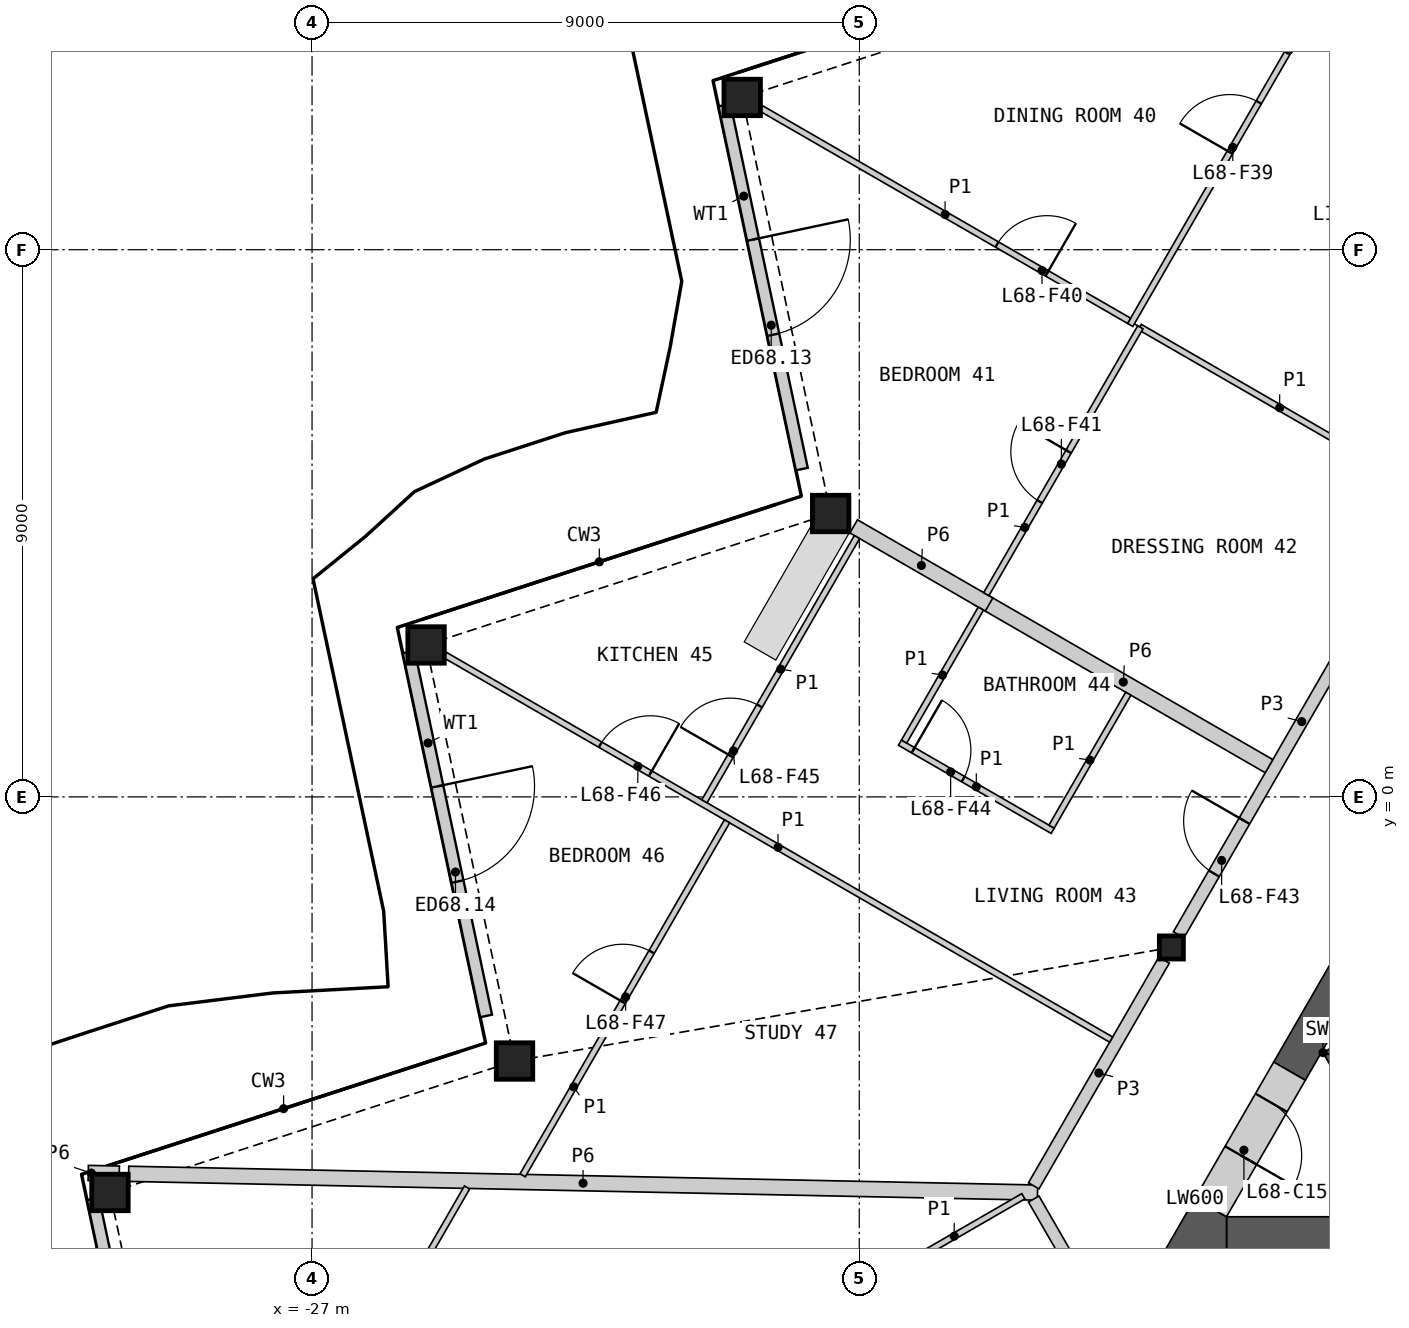
"""IFC4 building model, lengths in metres.
Left out: names, types, materials, properties, quantities, classifications, styles, units other than length and angle.
Written with IfcOpenShell. Run it as: python <this file> out.ifc"""

import sys

from ifc_helpers import new_model, si_unit, direction, frame, frame_2d, origin, origin_2d, place, context, subcontext, project, spatial, polyline, rectangle, hollow_rectangle, i_section, outline, extrude, element, fill, save


model = new_model("IFC4")
c1 = context("Model", 3, precision=1e-05, world=origin(), true_north=direction((0.0, 1.0)))
c2 = subcontext(c1, "Body", "Model", "MODEL_VIEW")
j1 = project(units=[si_unit("LENGTHUNIT", "METRE"), si_unit("PLANEANGLEUNIT", "RADIAN")], contexts=[c1])
p1 = place(None, origin())
s1 = spatial("IfcSite", under=j1, at=p1, CompositionType="ELEMENT")
p2 = place(p1, origin())
s2 = spatial("IfcBuilding", under=s1, at=p2, CompositionType="ELEMENT")
p3 = place(p2, frame((0.0, 0.0, 312.0)))
s3 = spatial("IfcBuildingStorey", under=s2, at=p3, CompositionType="ELEMENT", Elevation=312.0)
for number, where, z_axis, x_axis in (
    (1, (-19.926, 11.504, 0.0), (0.0, 0.0, 1.0), (1.0, 0.0, 0.0)),
    (2, (-18.471, 4.661, 0.0), (0.0, 0.0, 1.0), (1.0, 0.0, 0.0)),
    (3, (-25.125, 2.499, 0.0), (0.0, 0.0, 1.0), (1.0, 0.0, 0.0)),
    (4, (-23.67, -4.344, 0.0), (0.0, 0.0, 1.0), (1.0, 0.0, 0.0)),
    (5, (-30.324, -6.506, 0.0), (0.0, 0.0, 1.0), (1.0, 0.0, 0.0)),
):
    element("IfcColumn", number, at=place(p3, frame(where, z_axis=z_axis, x_axis=x_axis)), inside=s3, PredefinedType="COLUMN", context=c2, shape_type="SweptSolid", body=[
        extrude(hollow_rectangle(XDim=0.6, YDim=0.6, WallThickness=0.04, at=origin_2d()), origin(), (0.0, 0.0, 1.0), 3.4),
    ])
p4 = place(p3, frame((-12.868, -2.476, 0.0), z_axis=(0.0, 0.0, 1.0), x_axis=(1.0, 0.0, 0.0)))
e6 = element("IfcColumn", 6, at=p4, inside=s3, PredefinedType="COLUMN", context=c2, shape_type="SweptSolid", body=[
    extrude(i_section(OverallWidth=0.396, OverallDepth=0.381, WebThickness=0.019, FlangeThickness=0.03, at=origin_2d()), origin(), (0.0, 0.0, 1.0), 3.4),
])
p5 = place(p3, frame((-20.217, 11.377, 0.0), z_axis=(0.0, 0.0, 1.0), x_axis=(0.207885951908, -0.978153071354, 0.0)))
e7 = element("IfcWall", 7, at=p5, inside=s3, PredefinedType="SOLIDWALL", context=c2, shape_type="SweptSolid", body=[
    extrude(rectangle(XDim=6.12, YDim=0.2, at=frame_2d((3.06, 0.0))), origin(), (0.0, 0.0, 1.0), 2.488),
])
p6 = place(p5, frame((2.26, 0.0, 0.0)))
e8 = element("IfcOpeningElement", 8, at=p6, cuts=e7, PredefinedType="OPENING", context=c2, shape_type="SweptSolid", body=[
    extrude(rectangle(XDim=1.6, YDim=2.25, at=frame_2d((0.8, 1.125))), frame((0.0, 0.11, 0.0), z_axis=(0.0, -1.0, 0.0), x_axis=(1.0, 0.0, 0.0)), (0.0, 0.0, 1.0), 0.22),
])
p7 = place(p3, frame((-25.41, 2.383, 0.0), z_axis=(0.0, 0.0, 1.0), x_axis=(0.207894064368, -0.978151347185, 0.0)))
e9 = element("IfcWall", 9, at=p7, inside=s3, PredefinedType="SOLIDWALL", context=c2, shape_type="SweptSolid", body=[
    extrude(rectangle(XDim=6.12, YDim=0.2, at=frame_2d((3.06, 0.0))), origin(), (0.0, 0.0, 1.0), 2.488),
])
p8 = place(p7, frame((2.26, 0.0, 0.0)))
e10 = element("IfcOpeningElement", 10, at=p8, cuts=e9, PredefinedType="OPENING", context=c2, shape_type="SweptSolid", body=[
    extrude(rectangle(XDim=1.6, YDim=2.25, at=frame_2d((0.8, 1.125))), frame((0.0, 0.11, 0.0), z_axis=(0.0, -1.0, 0.0), x_axis=(1.0, 0.0, 0.0)), (0.0, 0.0, 1.0), 0.22),
])
p9 = place(p3, frame((-30.603, -6.611, 0.0), z_axis=(0.0, 0.0, 1.0), x_axis=(0.207921893309, -0.978145432072, 0.0)))
e11 = element("IfcWall", 11, at=p9, inside=s3, PredefinedType="SOLIDWALL", context=c2, shape_type="SweptSolid", body=[
    extrude(rectangle(XDim=6.475, YDim=0.2, at=frame_2d((3.237, 0.0))), origin(), (0.0, 0.0, 1.0), 2.488),
])
p10 = place(p9, frame((2.26, 0.0, 0.0)))
e12 = element("IfcOpeningElement", 12, at=p10, cuts=e11, PredefinedType="OPENING", context=c2, shape_type="SweptSolid", body=[
    extrude(rectangle(XDim=1.6, YDim=2.25, at=frame_2d((0.8, 1.125))), frame((0.0, 0.11, 0.0), z_axis=(0.0, -1.0, 0.0), x_axis=(1.0, 0.0, 0.0)), (0.0, 0.0, 1.0), 0.22),
])
p11 = place(p3, origin())
e13 = element("IfcWall", 13, at=p11, inside=s3, PredefinedType="SHEAR", context=c2, shape_type="SweptSolid", body=[
    extrude(outline(polyline([(-5.307, -1.281), (-10.374, -4.206), (-10.032, -4.298), (-5.182, -1.498), (-5.307, -1.281)])), origin(), (0.0, 0.0, 1.0), 3.1),
])
p12 = place(p3, origin())
e14 = element("IfcWall", 14, at=p12, inside=s3, PredefinedType="SHEAR", context=c2, shape_type="SweptSolid", body=[
    extrude(outline(polyline([(-10.374, -4.206), (-8.83, -6.881), (-8.738, -6.539), (-10.032, -4.298), (-10.374, -4.206)])), origin(), (0.0, 0.0, 1.0), 3.1),
])
p13 = place(p3, frame((-11.961, -7.206, 0.0), z_axis=(0.0, 0.0, 1.0), x_axis=(1.0, 0.0, 0.0)))
e15 = element("IfcWall", 15, at=p13, inside=s3, PredefinedType="SHEAR", context=c2, shape_type="SweptSolid", body=[
    extrude(rectangle(XDim=23.921, YDim=0.6, at=frame_2d((11.961, 0.0))), origin(), (0.0, 0.0, 1.0), 3.1),
])
p14 = place(p3, frame((-8.44, -0.208, 0.0), z_axis=(0.0, 0.0, 1.0), x_axis=(-0.500007425856, -0.866021116422, 0.0)))
e16 = element("IfcWall", 16, at=p14, inside=s3, PredefinedType="SHEAR", context=c2, shape_type="SweptSolid", body=[
    extrude(rectangle(XDim=4.969, YDim=0.6, at=frame_2d((2.484, 0.0))), origin(), (0.0, 0.0, 1.0), 3.1),
])
p15 = place(p3, origin())
e17 = element("IfcWall", 17, at=p15, inside=s3, PredefinedType="SHEAR", context=c2, shape_type="SweptSolid", body=[
    extrude(outline(polyline([(-12.48, -6.606), (-11.961, -6.906), (-11.961, -7.506), (-13.0, -7.506), (-12.48, -6.606)])), origin(), (0.0, 0.0, 1.0), 3.1),
])
p16 = place(p3, frame((-10.925, -4.511, 0.0), z_axis=(0.0, 0.0, 1.0), x_axis=(-0.500018667571, -0.866014625789, 0.0)))
e18 = element("IfcWall", 18, at=p16, inside=s3, PredefinedType="SHEAR", context=c2, shape_type="SweptSolid", body=[
    extrude(rectangle(XDim=2.592, YDim=0.6, at=frame_2d((1.296, 0.0))), origin(), (0.0, 0.0, 1.0), 3.1),
])
p17 = place(p16, frame((0.6, 0.0, 0.0)))
e19 = element("IfcOpeningElement", 19, at=p17, cuts=e18, PredefinedType="OPENING", context=c2, shape_type="SweptSolid", body=[
    extrude(rectangle(XDim=1.0, YDim=2.1, at=frame_2d((0.5, 1.05))), frame((0.0, 0.31, 0.0), z_axis=(0.0, -1.0, 0.0), x_axis=(1.0, 0.0, 0.0)), (0.0, 0.0, 1.0), 0.62),
])
p18 = place(p3, frame((-30.016, -6.199, 0.0), z_axis=(0.0, 0.0, 1.0), x_axis=(0.999786619639, -0.02065708573, 0.0)))
e20 = element("IfcWall", 20, at=p18, inside=s3, PredefinedType="PARTITIONING", context=c2, shape_type="SweptSolid", body=[
    extrude(rectangle(XDim=14.951, YDim=0.25, at=frame_2d((7.475, 0.0))), origin(), (0.0, 0.0, 1.0), 2.33),
])
p19 = place(p3, frame((-12.748, -2.269, 0.0), z_axis=(0.0, 0.0, 1.0), x_axis=(0.499984266882, 0.866034487114, 0.0)))
e21 = element("IfcWall", 21, at=p19, inside=s3, PredefinedType="PARTITIONING", context=c2, shape_type="SweptSolid", body=[
    extrude(rectangle(XDim=8.099, YDim=0.2, at=frame_2d((4.049, 0.0))), origin(), (0.0, 0.0, 1.0), 3.1),
])
p20 = place(p19, frame((1.164, 0.0, 0.0)))
e22 = element("IfcOpeningElement", 22, at=p20, cuts=e21, PredefinedType="OPENING", context=c2, shape_type="SweptSolid", body=[
    extrude(rectangle(XDim=1.0, YDim=2.1, at=frame_2d((0.5, 1.05))), frame((0.0, 0.11, 0.0), z_axis=(0.0, -1.0, 0.0), x_axis=(1.0, 0.0, 0.0)), (0.0, 0.0, 1.0), 0.22),
])
p21 = place(p3, frame((-16.055, 3.273, 0.0), z_axis=(0.0, 0.0, 1.0), x_axis=(0.866019581949, -0.500010083578, 0.0)))
e23 = element("IfcWall", 23, at=p21, inside=s3, PredefinedType="PARTITIONING", context=c2, shape_type="SweptSolid", body=[
    extrude(rectangle(XDim=5.535, YDim=0.25, at=frame_2d((2.768, 0.0))), origin(), (0.0, 0.0, 1.0), 2.33),
])
p22 = place(p3, frame((-15.131, -6.397, 0.0), z_axis=(0.0, 0.0, 1.0), x_axis=(0.500003406062, 0.866023437285, 0.0)))
e24 = element("IfcWall", 24, at=p22, inside=s3, PredefinedType="PARTITIONING", context=c2, shape_type="SweptSolid", body=[
    extrude(rectangle(XDim=4.288, YDim=0.2, at=frame_2d((2.144, 0.0))), origin(), (0.0, 0.0, 1.0), 3.1),
])
p23 = place(p3, frame((-15.131, -6.614, 0.0), z_axis=(0.0, 0.0, 1.0), x_axis=(0.499967746641, -0.866044024469, 0.0)))
e25 = element("IfcWall", 25, at=p23, inside=s3, PredefinedType="PARTITIONING", context=c2, shape_type="SweptSolid", body=[
    extrude(rectangle(XDim=3.676, YDim=0.2, at=frame_2d((1.838, 0.0))), origin(), (0.0, 0.0, 1.0), 3.1),
])
p24 = place(p23, frame((2.426, 0.0, 0.0)))
e26 = element("IfcOpeningElement", 26, at=p24, cuts=e25, PredefinedType="OPENING", context=c2, shape_type="SweptSolid", body=[
    extrude(rectangle(XDim=1.0, YDim=2.1, at=frame_2d((0.5, 1.05))), frame((0.0, 0.11, 0.0), z_axis=(0.0, -1.0, 0.0), x_axis=(1.0, 0.0, 0.0)), (0.0, 0.0, 1.0), 0.22),
])
p25 = place(p3, frame((-18.092, 4.449, 0.0), z_axis=(0.0, 0.0, 1.0), x_axis=(0.866043267704, -0.499969057507, 0.0)))
e27 = element("IfcWall", 27, at=p25, inside=s3, PredefinedType="PARTITIONING", context=c2, shape_type="SweptSolid", body=[
    extrude(rectangle(XDim=2.571, YDim=0.25, at=frame_2d((1.286, 0.0))), origin(), (0.0, 0.0, 1.0), 2.33),
])
p26 = place(p3, frame((-30.681, -6.186, 0.0), z_axis=(0.0, 0.0, 1.0), x_axis=(0.999788216533, -0.020579652135, 0.0)))
e28 = element("IfcWall", 28, at=p26, inside=s3, PredefinedType="PARTITIONING", context=c2, shape_type="SweptSolid", body=[
    extrude(rectangle(XDim=0.51, YDim=0.25, at=frame_2d((0.255, 0.0))), origin(), (0.0, 0.0, 1.0), 2.33),
])
p27 = place(p3, frame((-24.815, 2.334, 0.0), z_axis=(0.0, 0.0, 1.0), x_axis=(0.866024591023, -0.500001407741, 0.0)))
e29 = element("IfcWall", 29, at=p27, inside=s3, PredefinedType="PARTITIONING", context=c2, shape_type="SweptSolid", body=[
    extrude(rectangle(XDim=12.652, YDim=0.1, at=frame_2d((6.326, 0.0))), origin(), (0.0, 0.0, 1.0), 2.33),
])
p28 = place(p27, frame((2.95, 0.0, 0.0)))
e30 = element("IfcOpeningElement", 30, at=p28, cuts=e29, PredefinedType="OPENING", context=c2, shape_type="SweptSolid", body=[
    extrude(rectangle(XDim=0.95, YDim=2.1, at=frame_2d((0.475, 1.05))), frame((0.0, 0.06, 0.0), z_axis=(0.0, -1.0, 0.0), x_axis=(1.0, 0.0, 0.0)), (0.0, 0.0, 1.0), 0.12),
])
p29 = place(p3, frame((-13.544, 7.762, 0.0), z_axis=(0.0, 0.0, 1.0), x_axis=(0.499993819111, 0.866028972293, 0.0)))
e31 = element("IfcWall", 31, at=p29, inside=s3, PredefinedType="PARTITIONING", context=c2, shape_type="SweptSolid", body=[
    extrude(rectangle(XDim=10.436, YDim=0.1, at=frame_2d((5.218, 0.0))), origin(), (0.0, 0.0, 1.0), 2.33),
])
p30 = place(p29, frame((3.279, 0.0, 0.0)))
e32 = element("IfcOpeningElement", 32, at=p30, cuts=e31, PredefinedType="OPENING", context=c2, shape_type="SweptSolid", body=[
    extrude(rectangle(XDim=0.95, YDim=2.1, at=frame_2d((0.475, 1.05))), frame((0.0, 0.06, 0.0), z_axis=(0.0, -1.0, 0.0), x_axis=(1.0, 0.0, 0.0)), (0.0, 0.0, 1.0), 0.12),
])
p31 = place(p3, frame((-19.615, 11.325, 0.0), z_axis=(0.0, 0.0, 1.0), x_axis=(0.866013987544, -0.500019772988, 0.0)))
e33 = element("IfcWall", 33, at=p31, inside=s3, PredefinedType="PARTITIONING", context=c2, shape_type="SweptSolid", body=[
    extrude(rectangle(XDim=6.99, YDim=0.1, at=frame_2d((3.495, 0.0))), origin(), (0.0, 0.0, 1.0), 2.33),
])
p32 = place(p31, frame((4.48, 0.0, 0.0)))
e34 = element("IfcOpeningElement", 34, at=p32, cuts=e33, PredefinedType="OPENING", context=c2, shape_type="SweptSolid", body=[
    extrude(rectangle(XDim=0.95, YDim=2.1, at=frame_2d((0.475, 1.05))), frame((0.0, 0.06, 0.0), z_axis=(0.0, -1.0, 0.0), x_axis=(1.0, 0.0, 0.0)), (0.0, 0.0, 1.0), 0.12),
])
p33 = place(p3, frame((-23.536, -6.224, 0.0), z_axis=(0.0, 0.0, 1.0), x_axis=(0.500002256251, 0.866024101133, 0.0)))
e35 = element("IfcWall", 35, at=p33, inside=s3, PredefinedType="PARTITIONING", context=c2, shape_type="SweptSolid", body=[
    extrude(rectangle(XDim=6.722, YDim=0.1, at=frame_2d((3.361, 0.0))), origin(), (0.0, 0.0, 1.0), 2.33),
])
p34 = place(p33, frame((3.292, 0.0, 0.0)))
e36 = element("IfcOpeningElement", 36, at=p34, cuts=e35, PredefinedType="OPENING", context=c2, shape_type="SweptSolid", body=[
    extrude(rectangle(XDim=0.95, YDim=2.1, at=frame_2d((0.475, 1.05))), frame((0.0, 0.06, 0.0), z_axis=(0.0, -1.0, 0.0), x_axis=(1.0, 0.0, 0.0)), (0.0, 0.0, 1.0), 0.12),
])
p35 = place(p3, frame((-13.386, 7.729, 0.0), z_axis=(0.0, 0.0, 1.0), x_axis=(0.866034036823, -0.49998504684, 0.0)))
e37 = element("IfcWall", 37, at=p35, inside=s3, PredefinedType="PARTITIONING", context=c2, shape_type="SweptSolid", body=[
    extrude(rectangle(XDim=5.312, YDim=0.1, at=frame_2d((2.656, 0.0))), origin(), (0.0, 0.0, 1.0), 2.33),
])
p36 = place(p3, frame((-15.912, 3.335, 0.0), z_axis=(0.0, 0.0, 1.0), x_axis=(0.49999906822, 0.866025941747, 0.0)))
e38 = element("IfcWall", 38, at=p36, inside=s3, PredefinedType="PARTITIONING", context=c2, shape_type="SweptSolid", body=[
    extrude(rectangle(XDim=5.068, YDim=0.1, at=frame_2d((2.534, 0.0))), origin(), (0.0, 0.0, 1.0), 2.33),
])
p37 = place(p36, frame((1.757, 0.0, 0.0)))
e39 = element("IfcOpeningElement", 39, at=p37, cuts=e38, PredefinedType="OPENING", context=c2, shape_type="SweptSolid", body=[
    extrude(rectangle(XDim=0.95, YDim=2.1, at=frame_2d((0.475, 1.05))), frame((0.0, 0.06, 0.0), z_axis=(0.0, -1.0, 0.0), x_axis=(1.0, 0.0, 0.0)), (0.0, 0.0, 1.0), 0.12),
])
p38 = place(p3, frame((-20.547, -0.072, 0.0), z_axis=(0.0, 0.0, 1.0), x_axis=(0.499969537666, 0.866042990507, 0.0)))
e40 = element("IfcWall", 40, at=p38, inside=s3, PredefinedType="PARTITIONING", context=c2, shape_type="SweptSolid", body=[
    extrude(rectangle(XDim=5.018, YDim=0.1, at=frame_2d((2.509, 0.0))), origin(), (0.0, 0.0, 1.0), 2.33),
])
p39 = place(p38, frame((0.862, 0.0, 0.0)))
e41 = element("IfcOpeningElement", 41, at=p39, cuts=e40, PredefinedType="OPENING", context=c2, shape_type="SweptSolid", body=[
    extrude(rectangle(XDim=0.95, YDim=2.1, at=frame_2d((0.475, 1.05))), frame((0.0, 0.06, 0.0), z_axis=(0.0, -1.0, 0.0), x_axis=(1.0, 0.0, 0.0)), (0.0, 0.0, 1.0), 0.12),
])
p40 = place(p3, frame((-26.736, -10.38, 0.0), z_axis=(0.0, 0.0, 1.0), x_axis=(0.500024700597, 0.866011142419, 0.0)))
e42 = element("IfcWall", 42, at=p40, inside=s3, PredefinedType="PARTITIONING", context=c2, shape_type="SweptSolid", body=[
    extrude(rectangle(XDim=4.568, YDim=0.1, at=frame_2d((2.284, 0.0))), origin(), (0.0, 0.0, 1.0), 2.33),
])
p41 = place(p40, frame((0.652, 0.0, 0.0)))
e43 = element("IfcOpeningElement", 43, at=p41, cuts=e42, PredefinedType="OPENING", context=c2, shape_type="SweptSolid", body=[
    extrude(rectangle(XDim=0.95, YDim=2.1, at=frame_2d((0.475, 1.05))), frame((0.0, 0.06, 0.0), z_axis=(0.0, -1.0, 0.0), x_axis=(1.0, 0.0, 0.0)), (0.0, 0.0, 1.0), 0.12),
])
p42 = place(p3, frame((-17.331, 0.892, 0.0), z_axis=(0.0, 0.0, 1.0), x_axis=(0.866032775405, -0.499987231761, 0.0)))
e44 = element("IfcWall", 44, at=p42, inside=s3, PredefinedType="PARTITIONING", context=c2, shape_type="SweptSolid", body=[
    extrude(rectangle(XDim=2.9, YDim=0.1, at=frame_2d((1.45, 0.0))), origin(), (0.0, 0.0, 1.0), 2.33),
])
p43 = place(p42, frame((0.25, 0.0, 0.0)))
e45 = element("IfcOpeningElement", 45, at=p43, cuts=e44, PredefinedType="OPENING", context=c2, shape_type="SweptSolid", body=[
    extrude(rectangle(XDim=0.95, YDim=2.1, at=frame_2d((0.475, 1.05))), frame((0.0, 0.06, 0.0), z_axis=(0.0, -1.0, 0.0), x_axis=(1.0, 0.0, 0.0)), (0.0, 0.0, 1.0), 0.12),
])
for number, where, z_axis, x_axis in (
    (46, (-14.838, -0.489, 0.0), (0.0, 0.0, 1.0), (0.5, 0.866, 0.0)),
    (47, (-17.263, 0.911, 0.0), (0.0, 0.0, 1.0), (0.5, 0.866, 0.0)),
):
    element("IfcWall", number, at=place(p3, frame(where, z_axis=z_axis, x_axis=x_axis)), inside=s3, PredefinedType="PARTITIONING", context=c2, shape_type="SweptSolid", body=[
        extrude(rectangle(XDim=2.525, YDim=0.1, at=frame_2d((1.262, 0.0))), origin(), (0.0, 0.0, 1.0), 2.33),
    ])
p44 = place(p3, frame((-17.575, -7.881, 0.0), z_axis=(0.0, 0.0, 1.0), x_axis=(0.866013657776, 0.500020344131, 0.0)))
e48 = element("IfcWall", 48, at=p44, inside=s3, PredefinedType="PARTITIONING", context=c2, shape_type="SweptSolid", body=[
    extrude(rectangle(XDim=2.625, YDim=0.1, at=frame_2d((1.312, 0.0))), origin(), (0.0, 0.0, 1.0), 2.33),
])
p45 = place(p6, origin())
e49 = element("IfcDoor", 49, at=p45, inside=s3, OperationType="DOUBLE_DOOR_SINGLE_SWING", PredefinedType="DOOR", context=c2, shape_type="SweptSolid", body=[
    extrude(rectangle(XDim=1.6, YDim=2.25, at=frame_2d((0.8, 1.125))), frame((0.0, 0.025, 0.0), z_axis=(0.0, -1.0, 0.0), x_axis=(1.0, 0.0, 0.0)), (0.0, 0.0, 1.0), 0.05),
])
fill(e8, e49)
p46 = place(p8, origin())
e50 = element("IfcDoor", 50, at=p46, inside=s3, OperationType="DOUBLE_DOOR_SINGLE_SWING", PredefinedType="DOOR", context=c2, shape_type="SweptSolid", body=[
    extrude(rectangle(XDim=1.6, YDim=2.25, at=frame_2d((0.8, 1.125))), frame((0.0, 0.025, 0.0), z_axis=(0.0, -1.0, 0.0), x_axis=(1.0, 0.0, 0.0)), (0.0, 0.0, 1.0), 0.05),
])
fill(e10, e50)
p47 = place(p17, origin())
e51 = element("IfcDoor", 51, at=p47, inside=s3, OperationType="SINGLE_SWING_RIGHT", PredefinedType="DOOR", context=c2, shape_type="SweptSolid", body=[
    extrude(rectangle(XDim=1.0, YDim=2.1, at=frame_2d((0.5, 1.05))), frame((0.0, 0.055, 0.0), z_axis=(0.0, -1.0, 0.0), x_axis=(1.0, 0.0, 0.0)), (0.0, 0.0, 1.0), 0.05),
])
fill(e19, e51)
p48 = place(p30, origin())
e52 = element("IfcDoor", 52, at=p48, inside=s3, OperationType="SINGLE_SWING_LEFT", PredefinedType="DOOR", context=c2, shape_type="SweptSolid", body=[
    extrude(rectangle(XDim=0.95, YDim=2.1, at=frame_2d((0.475, 1.05))), frame((0.0, 0.025, 0.0), z_axis=(0.0, -1.0, 0.0), x_axis=(1.0, 0.0, 0.0)), (0.0, 0.0, 1.0), 0.05),
])
fill(e32, e52)
p49 = place(p32, origin())
e53 = element("IfcDoor", 53, at=p49, inside=s3, OperationType="SINGLE_SWING_RIGHT", PredefinedType="DOOR", context=c2, shape_type="SweptSolid", body=[
    extrude(rectangle(XDim=0.95, YDim=2.1, at=frame_2d((0.475, 1.05))), frame((0.0, 0.025, 0.0), z_axis=(0.0, -1.0, 0.0), x_axis=(1.0, 0.0, 0.0)), (0.0, 0.0, 1.0), 0.05),
])
fill(e34, e53)
p50 = place(p37, origin())
e54 = element("IfcDoor", 54, at=p50, inside=s3, OperationType="SINGLE_SWING_RIGHT", PredefinedType="DOOR", context=c2, shape_type="SweptSolid", body=[
    extrude(rectangle(XDim=0.95, YDim=2.1, at=frame_2d((0.475, 1.05))), frame((0.0, 0.025, 0.0), z_axis=(0.0, -1.0, 0.0), x_axis=(1.0, 0.0, 0.0)), (0.0, 0.0, 1.0), 0.05),
])
fill(e39, e54)
p51 = place(p20, origin())
e55 = element("IfcDoor", 55, at=p51, inside=s3, OperationType="SINGLE_SWING_RIGHT", PredefinedType="DOOR", context=c2, shape_type="SweptSolid", body=[
    extrude(rectangle(XDim=1.0, YDim=2.1, at=frame_2d((0.5, 1.05))), frame((0.0, 0.025, 0.0), z_axis=(0.0, -1.0, 0.0), x_axis=(1.0, 0.0, 0.0)), (0.0, 0.0, 1.0), 0.05),
])
fill(e22, e55)
p52 = place(p43, origin())
e56 = element("IfcDoor", 56, at=p52, inside=s3, OperationType="SINGLE_SWING_LEFT", PredefinedType="DOOR", context=c2, shape_type="SweptSolid", body=[
    extrude(rectangle(XDim=0.95, YDim=2.1, at=frame_2d((0.475, 1.05))), frame((0.0, 0.025, 0.0), z_axis=(0.0, -1.0, 0.0), x_axis=(1.0, 0.0, 0.0)), (0.0, 0.0, 1.0), 0.05),
])
fill(e45, e56)
p53 = place(p39, origin())
e57 = element("IfcDoor", 57, at=p53, inside=s3, OperationType="SINGLE_SWING_LEFT", PredefinedType="DOOR", context=c2, shape_type="SweptSolid", body=[
    extrude(rectangle(XDim=0.95, YDim=2.1, at=frame_2d((0.475, 1.05))), frame((0.0, 0.025, 0.0), z_axis=(0.0, -1.0, 0.0), x_axis=(1.0, 0.0, 0.0)), (0.0, 0.0, 1.0), 0.05),
])
fill(e41, e57)
p54 = place(p28, origin())
e58 = element("IfcDoor", 58, at=p54, inside=s3, OperationType="SINGLE_SWING_RIGHT", PredefinedType="DOOR", context=c2, shape_type="SweptSolid", body=[
    extrude(rectangle(XDim=0.95, YDim=2.1, at=frame_2d((0.475, 1.05))), frame((0.0, 0.025, 0.0), z_axis=(0.0, -1.0, 0.0), x_axis=(1.0, 0.0, 0.0)), (0.0, 0.0, 1.0), 0.05),
])
fill(e30, e58)
p55 = place(p34, origin())
e59 = element("IfcDoor", 59, at=p55, inside=s3, OperationType="SINGLE_SWING_LEFT", PredefinedType="DOOR", context=c2, shape_type="SweptSolid", body=[
    extrude(rectangle(XDim=0.95, YDim=2.1, at=frame_2d((0.475, 1.05))), frame((0.0, 0.025, 0.0), z_axis=(0.0, -1.0, 0.0), x_axis=(1.0, 0.0, 0.0)), (0.0, 0.0, 1.0), 0.05),
])
fill(e36, e59)
save(model, sys.argv[1])
